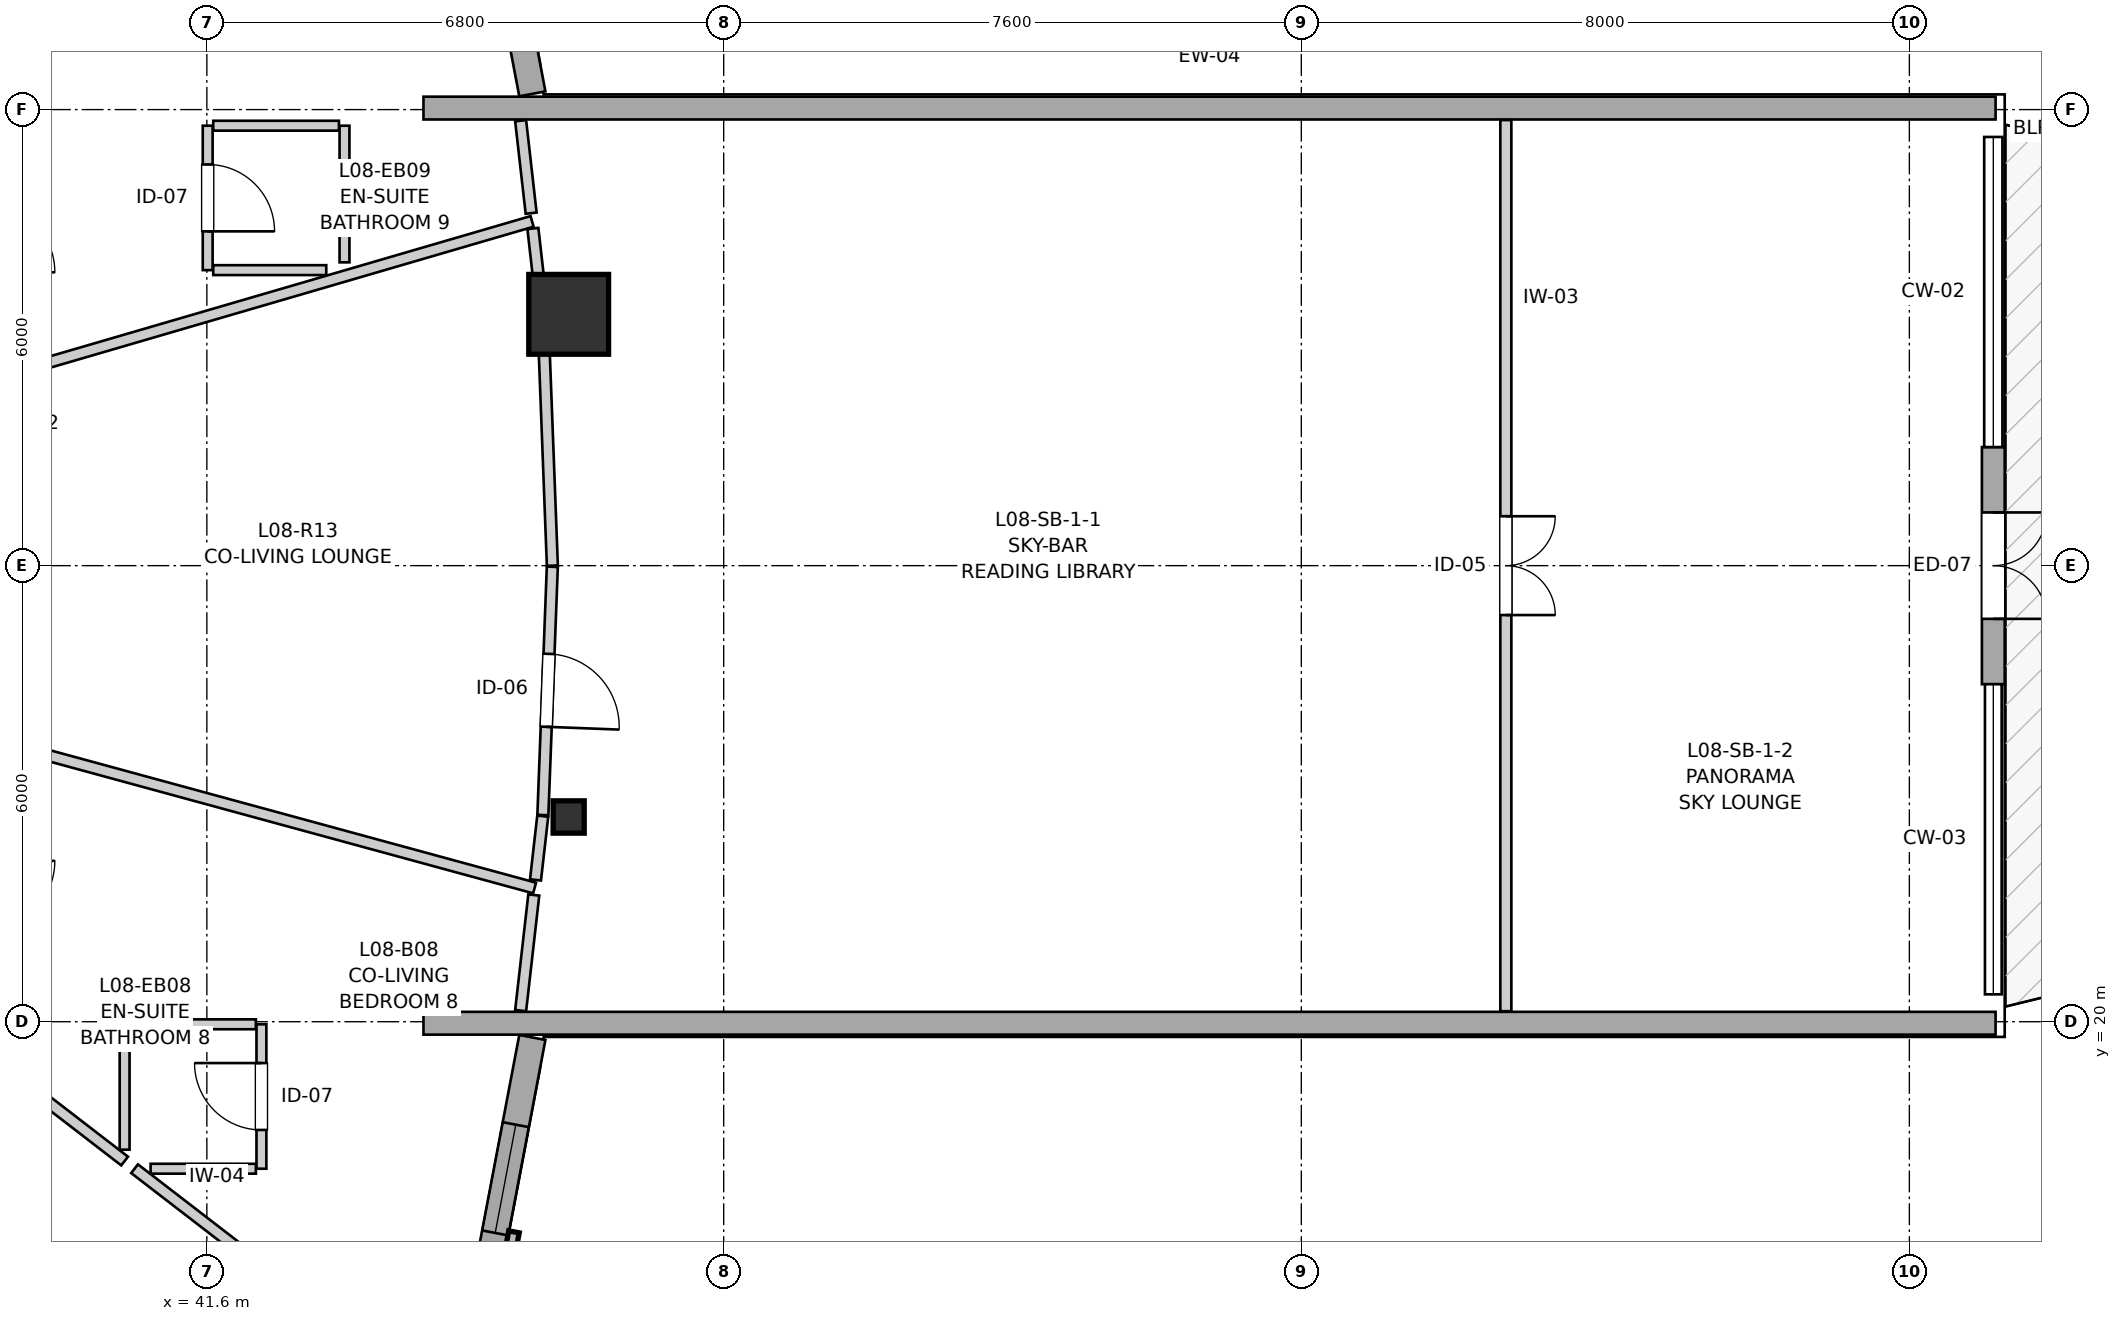
"""IFC4 building model, lengths in metres.
Left out: names, types, materials, properties, quantities, classifications, styles, units other than length and angle.
Written with IfcOpenShell. Run it as: python <this file> out.ifc"""

import sys

from ifc_helpers import new_model, si_unit, direction, frame, frame_2d, origin, origin_2d, place, context, subcontext, project, spatial, rectangle, i_section, extrude, source, transform, mapped, element, fill, save


model = new_model("IFC4")
c1 = context("Model", 3, precision=1e-05, world=origin(), true_north=direction((0.0, 1.0)))
c2 = subcontext(c1, "Body", "Model", "MODEL_VIEW")
j1 = project(units=[si_unit("LENGTHUNIT", "METRE"), si_unit("PLANEANGLEUNIT", "RADIAN")], contexts=[c1])
p1 = place(None, origin())
s1 = spatial("IfcSite", under=j1, at=p1, CompositionType="ELEMENT")
p2 = place(p1, origin())
s2 = spatial("IfcBuilding", under=s1, at=p2, CompositionType="ELEMENT")
p3 = place(p2, frame((0.0, 0.0, 30.2)))
s3 = spatial("IfcBuildingStorey", under=s2, at=p3, CompositionType="ELEMENT", Elevation=30.2)
m1 = source(origin(), c2, "Body", "SweptSolid", [
    extrude(i_section(OverallWidth=0.409, OverallDepth=0.425, WebThickness=0.03, FlangeThickness=0.048, FilletRadius=0.015, at=origin_2d()), origin(), (0.0, 0.0, 1.0), 2.935),
])
p4 = place(p3, frame((46.361, 22.694, 0.0), z_axis=(0.0, 0.0, 1.0), x_axis=(1.0, 0.0, 0.0)))
e1 = element("IfcColumn", 1, at=p4, inside=s3, PredefinedType="PILASTER", context=c2, shape_type="MappedRepresentation", body=[
    mapped(m1, transform((0.0, 0.0, 0.0), x_axis=(1.0, 0.0, 0.0), y_axis=(0.0, 1.0, 0.0), z_axis=(0.0, 0.0, 1.0), scale=1.0)),
])
m2 = source(origin(), c2, "Body", "SweptSolid", [
    extrude(rectangle(XDim=1.05, YDim=1.05, at=origin_2d()), origin(), (0.0, 0.0, 1.0), 2.935),
])
p5 = place(p3, frame((46.361, 29.306, 0.0), z_axis=(0.0, 0.0, 1.0), x_axis=(1.0, 0.0, 0.0)))
e2 = element("IfcColumn", 2, at=p5, inside=s3, PredefinedType="COLUMN", context=c2, shape_type="MappedRepresentation", body=[
    mapped(m2, transform((0.0, 0.0, 0.0), x_axis=(1.0, 0.0, 0.0), y_axis=(0.0, 1.0, 0.0), z_axis=(0.0, 0.0, 1.0), scale=1.0)),
])
p6 = place(p3, frame((45.24, 16.408, 0.0), z_axis=(0.0, 0.0, 1.0), x_axis=(0.186636709983, 0.982428999209, 0.0)))
e3 = element("IfcWall", 3, at=p6, inside=s3, PredefinedType="SOLIDWALL", context=c2, shape_type="SweptSolid", body=[
    extrude(rectangle(XDim=3.446, YDim=0.35, at=frame_2d((1.723, 0.0))), origin(), (0.0, 0.0, 1.0), 2.415),
])
p7 = place(p6, frame((0.828, 0.0, 0.82)))
e4 = element("IfcOpeningElement", 4, at=p7, cuts=e3, PredefinedType="OPENING", context=c2, shape_type="SweptSolid", body=[
    extrude(rectangle(XDim=1.45, YDim=1.25, at=frame_2d((0.725, 0.625))), frame((0.0, 0.185, 0.0), z_axis=(0.0, -1.0, 0.0), x_axis=(1.0, 0.0, 0.0)), (0.0, 0.0, 1.0), 0.37),
])
p8 = place(p3, frame((45.883, 32.207, 0.0), z_axis=(0.0, 0.0, 1.0), x_axis=(-0.186693533797, 0.982418202416, 0.0)))
e5 = element("IfcWall", 5, at=p8, inside=s3, PredefinedType="SOLIDWALL", context=c2, shape_type="SweptSolid", body=[
    extrude(rectangle(XDim=3.726, YDim=0.35, at=frame_2d((1.863, 0.0))), origin(), (0.0, 0.0, 1.0), 2.415),
])
p9 = place(p8, frame((1.313, 0.0, 0.82)))
e6 = element("IfcOpeningElement", 6, at=p9, cuts=e5, PredefinedType="OPENING", context=c2, shape_type="SweptSolid", body=[
    extrude(rectangle(XDim=1.45, YDim=1.25, at=frame_2d((0.725, 0.625))), frame((0.0, 0.185, 0.0), z_axis=(0.0, -1.0, 0.0), x_axis=(1.0, 0.0, 0.0)), (0.0, 0.0, 1.0), 0.37),
])
for number, where, z_axis, x_axis in (
    (7, (44.45, 32.02, 0.0), (0.0, 0.0, 1.0), (1.0, 0.0, 0.0)),
    (8, (44.45, 19.98, 0.0), (0.0, 0.0, 1.0), (1.0, 0.0, 0.0)),
):
    element("IfcWall", number, at=place(p3, frame(where, z_axis=z_axis, x_axis=x_axis)), inside=s3, PredefinedType="SOLIDWALL", context=c2, shape_type="SweptSolid", body=[
        extrude(rectangle(XDim=20.685, YDim=0.3, at=frame_2d((10.342, 0.0))), origin(), (0.0, 0.0, 1.0), 2.115),
    ])
p10 = place(p3, frame((65.104, 27.56, 0.0), z_axis=(0.0, 0.0, 1.0), x_axis=(0.0, -1.0, 0.0)))
e9 = element("IfcWall", 9, at=p10, inside=s3, PredefinedType="SOLIDWALL", context=c2, shape_type="SweptSolid", body=[
    extrude(rectangle(XDim=3.12, YDim=0.3, at=frame_2d((1.56, 0.0))), origin(), (0.0, 0.0, 1.0), 2.3),
])
p11 = place(p10, frame((0.86, 0.0, 0.0)))
e10 = element("IfcOpeningElement", 10, at=p11, cuts=e9, PredefinedType="OPENING", context=c2, shape_type="SweptSolid", body=[
    extrude(rectangle(XDim=1.4, YDim=2.15, at=frame_2d((0.7, 1.075))), frame((0.0, 0.16, 0.0), z_axis=(0.0, -1.0, 0.0), x_axis=(1.0, 0.0, 0.0)), (0.0, 0.0, 1.0), 0.32),
])
p12 = place(p3, frame((58.691, 31.862, 0.0), z_axis=(0.0, 0.0, 1.0), x_axis=(0.0, -1.0, 0.0)))
e11 = element("IfcWall", 11, at=p12, inside=s3, PredefinedType="PARTITIONING", context=c2, shape_type="SweptSolid", body=[
    extrude(rectangle(XDim=11.724, YDim=0.145, at=frame_2d((5.862, 0.0))), origin(), (0.0, 0.0, 1.0), 2.353),
])
p13 = place(p12, frame((5.212, 0.0, 0.0)))
e12 = element("IfcOpeningElement", 12, at=p13, cuts=e11, PredefinedType="OPENING", context=c2, shape_type="SweptSolid", body=[
    extrude(rectangle(XDim=1.3, YDim=2.1, at=frame_2d((0.65, 1.05))), frame((0.0, 0.083, 0.0), z_axis=(0.0, -1.0, 0.0), x_axis=(1.0, 0.0, 0.0)), (0.0, 0.0, 1.0), 0.165),
])
p14 = place(p3, frame((46.146, 25.985, 0.0), z_axis=(0.0, 0.0, 1.0), x_axis=(-0.038094618751, -0.999274136572, 0.0)))
e13 = element("IfcWall", 13, at=p14, inside=s3, PredefinedType="PARTITIONING", context=c2, shape_type="SweptSolid", body=[
    extrude(rectangle(XDim=3.269, YDim=0.145, at=frame_2d((1.634, 0.0))), origin(), (0.0, 0.0, 1.0), 2.403),
])
p15 = place(p14, frame((1.147, 0.0, 0.0)))
e14 = element("IfcOpeningElement", 14, at=p15, cuts=e13, PredefinedType="OPENING", context=c2, shape_type="SweptSolid", body=[
    extrude(rectangle(XDim=0.96, YDim=2.1, at=frame_2d((0.48, 1.05))), frame((0.0, 0.083, 0.0), z_axis=(0.0, -1.0, 0.0), x_axis=(1.0, 0.0, 0.0)), (0.0, 0.0, 1.0), 0.165),
])
p16 = place(p3, frame((42.318, 18.066, 0.0), z_axis=(0.0, 0.0, 1.0), x_axis=(0.0, 1.0, 0.0)))
e15 = element("IfcWall", 15, at=p16, inside=s3, PredefinedType="PARTITIONING", context=c2, shape_type="SweptSolid", body=[
    extrude(rectangle(XDim=1.9, YDim=0.13, at=frame_2d((0.95, 0.0))), origin(), (0.0, 0.0, 1.0), 2.935),
])
p17 = place(p16, frame((0.51, 0.0, 0.0)))
e16 = element("IfcOpeningElement", 16, at=p17, cuts=e15, PredefinedType="OPENING", context=c2, shape_type="SweptSolid", body=[
    extrude(rectangle(XDim=0.88, YDim=2.05, at=frame_2d((0.44, 1.025))), frame((0.0, 0.075, 0.0), z_axis=(0.0, -1.0, 0.0), x_axis=(1.0, 0.0, 0.0)), (0.0, 0.0, 1.0), 0.15),
])
p18 = place(p3, frame((41.611, 31.788, 0.0), z_axis=(0.0, 0.0, 1.0), x_axis=(0.0, -1.0, 0.0)))
e17 = element("IfcWall", 17, at=p18, inside=s3, PredefinedType="PARTITIONING", context=c2, shape_type="SweptSolid", body=[
    extrude(rectangle(XDim=1.9, YDim=0.13, at=frame_2d((0.95, 0.0))), origin(), (0.0, 0.0, 1.0), 2.935),
])
p19 = place(p18, frame((0.51, 0.0, 0.0)))
e18 = element("IfcOpeningElement", 18, at=p19, cuts=e17, PredefinedType="OPENING", context=c2, shape_type="SweptSolid", body=[
    extrude(rectangle(XDim=0.88, YDim=2.05, at=frame_2d((0.44, 1.025))), frame((0.0, 0.075, 0.0), z_axis=(0.0, -1.0, 0.0), x_axis=(1.0, 0.0, 0.0)), (0.0, 0.0, 1.0), 0.15),
])
p20 = place(p3, frame((38.81, 32.306, 0.0), z_axis=(0.0, 0.0, 1.0), x_axis=(0.801799720797, 0.597592844443, 0.0)))
e19 = element("IfcWall", 19, at=p20, inside=s3, PredefinedType="PARTITIONING", context=c2, shape_type="SweptSolid", body=[
    extrude(rectangle(XDim=7.424, YDim=0.145, at=frame_2d((3.712, 0.0))), origin(), (0.0, 0.0, 1.0), 2.935),
])
p21 = place(p3, frame((38.788, 28.46, 0.0), z_axis=(0.0, 0.0, 1.0), x_axis=(0.959983709987, 0.280055845432, 0.0)))
e20 = element("IfcWall", 20, at=p21, inside=s3, PredefinedType="PARTITIONING", context=c2, shape_type="SweptSolid", body=[
    extrude(rectangle(XDim=7.386, YDim=0.145, at=frame_2d((3.693, 0.0))), origin(), (0.0, 0.0, 1.0), 2.935),
])
p22 = place(p3, frame((38.787, 23.701, 0.0), z_axis=(0.0, 0.0, 1.0), x_axis=(0.964810342249, -0.262946769308, 0.0)))
e21 = element("IfcWall", 21, at=p22, inside=s3, PredefinedType="PARTITIONING", context=c2, shape_type="SweptSolid", body=[
    extrude(rectangle(XDim=7.385, YDim=0.145, at=frame_2d((3.692, 0.0))), origin(), (0.0, 0.0, 1.0), 2.935),
])
p23 = place(p3, frame((38.812, 17.101, 0.0), z_axis=(0.0, 0.0, 1.0), x_axis=(0.689140556814, -0.724627692649, 0.0)))
e22 = element("IfcWall", 22, at=p23, inside=s3, PredefinedType="PARTITIONING", context=c2, shape_type="SweptSolid", body=[
    extrude(rectangle(XDim=7.217, YDim=0.13, at=frame_2d((3.608, 0.0))), origin(), (0.0, 0.0, 1.0), 2.935),
])
p24 = place(p3, frame((40.649, 18.066, 0.0), z_axis=(0.0, 0.0, 1.0), x_axis=(0.792155051101, -0.610319895641, 0.0)))
e23 = element("IfcWall", 23, at=p24, inside=s3, PredefinedType="PARTITIONING", context=c2, shape_type="SweptSolid", body=[
    extrude(rectangle(XDim=5.093, YDim=0.145, at=frame_2d((2.546, 0.0))), origin(), (0.0, 0.0, 1.0), 2.935),
])
p25 = place(p3, frame((46.021, 29.281, 0.0), z_axis=(0.0, 0.0, 1.0), x_axis=(0.038070453861, -0.999275057501, 0.0)))
e24 = element("IfcWall", 24, at=p25, inside=s3, PredefinedType="PARTITIONING", context=c2, shape_type="SweptSolid", body=[
    extrude(rectangle(XDim=3.283, YDim=0.145, at=frame_2d((1.642, 0.0))), origin(), (0.0, 0.0, 1.0), 2.403),
])
p26 = place(p3, frame((38.811, 19.482, 0.0), z_axis=(0.0, 0.0, 1.0), x_axis=(0.792185877025, -0.61027988353, 0.0)))
e25 = element("IfcWall", 25, at=p26, inside=s3, PredefinedType="PARTITIONING", context=c2, shape_type="SweptSolid", body=[
    extrude(rectangle(XDim=2.156, YDim=0.145, at=frame_2d((1.078, 0.0))), origin(), (0.0, 0.0, 1.0), 2.935),
])
p27 = place(p3, frame((43.411, 29.99, 0.0), z_axis=(0.0, 0.0, 1.0), x_axis=(0.0, 1.0, 0.0)))
e26 = element("IfcWall", 26, at=p27, inside=s3, PredefinedType="PARTITIONING", context=c2, shape_type="SweptSolid", body=[
    extrude(rectangle(XDim=1.798, YDim=0.13, at=frame_2d((0.899, 0.0))), origin(), (0.0, 0.0, 1.0), 2.935),
])
p28 = place(p3, frame((41.684, 31.788, 0.0), z_axis=(0.0, 0.0, 1.0), x_axis=(1.0, 0.0, 0.0)))
e27 = element("IfcWall", 27, at=p28, inside=s3, PredefinedType="PARTITIONING", context=c2, shape_type="SweptSolid", body=[
    extrude(rectangle(XDim=1.654, YDim=0.13, at=frame_2d((0.827, 0.0))), origin(), (0.0, 0.0, 1.0), 2.103),
])
p29 = place(p3, frame((41.684, 29.888, 0.0), z_axis=(0.0, 0.0, 1.0), x_axis=(1.0, 0.0, 0.0)))
e28 = element("IfcWall", 28, at=p29, inside=s3, PredefinedType="PARTITIONING", context=c2, shape_type="SweptSolid", body=[
    extrude(rectangle(XDim=1.487, YDim=0.13, at=frame_2d((0.743, 0.0))), origin(), (0.0, 0.0, 1.0), 2.935),
])
p30 = place(p3, frame((40.518, 19.966, 0.0), z_axis=(0.0, 0.0, 1.0), x_axis=(1.0, 0.0, 0.0)))
e29 = element("IfcWall", 29, at=p30, inside=s3, PredefinedType="PARTITIONING", context=c2, shape_type="SweptSolid", body=[
    extrude(rectangle(XDim=1.727, YDim=0.13, at=frame_2d((0.864, 0.0))), origin(), (0.0, 0.0, 1.0), 2.103),
])
p31 = place(p3, frame((40.518, 18.317, 0.0), z_axis=(0.0, 0.0, 1.0), x_axis=(0.0, 1.0, 0.0)))
e30 = element("IfcWall", 30, at=p31, inside=s3, PredefinedType="PARTITIONING", context=c2, shape_type="SweptSolid", body=[
    extrude(rectangle(XDim=1.576, YDim=0.13, at=frame_2d((0.788, 0.0))), origin(), (0.0, 0.0, 1.0), 2.935),
])
p32 = place(p3, frame((40.86, 18.066, 0.0), z_axis=(0.0, 0.0, 1.0), x_axis=(1.0, 0.0, 0.0)))
e31 = element("IfcWall", 31, at=p32, inside=s3, PredefinedType="PARTITIONING", context=c2, shape_type="SweptSolid", body=[
    extrude(rectangle(XDim=1.385, YDim=0.13, at=frame_2d((0.692, 0.0))), origin(), (0.0, 0.0, 1.0), 2.935),
])
p33 = place(p3, frame((45.729, 20.146, 0.0), z_axis=(0.0, 0.0, 1.0), x_axis=(0.113074294354, 0.993586535716, 0.0)))
e32 = element("IfcWall", 32, at=p33, inside=s3, PredefinedType="PARTITIONING", context=c2, shape_type="SweptSolid", body=[
    extrude(rectangle(XDim=1.531, YDim=0.145, at=frame_2d((0.765, 0.0))), origin(), (0.0, 0.0, 1.0), 2.403),
])
p34 = place(p3, frame((45.89, 30.436, 0.0), z_axis=(0.0, 0.0, 1.0), x_axis=(0.113024308153, -0.993592223081, 0.0)))
e33 = element("IfcWall", 33, at=p34, inside=s3, PredefinedType="PARTITIONING", context=c2, shape_type="SweptSolid", body=[
    extrude(rectangle(XDim=1.147, YDim=0.145, at=frame_2d((0.573, 0.0))), origin(), (0.0, 0.0, 1.0), 2.403),
])
p35 = place(p3, frame((45.729, 31.854, 0.0), z_axis=(0.0, 0.0, 1.0), x_axis=(0.112860473391, -0.993610846129, 0.0)))
e34 = element("IfcWall", 34, at=p35, inside=s3, PredefinedType="PARTITIONING", context=c2, shape_type="SweptSolid", body=[
    extrude(rectangle(XDim=1.224, YDim=0.145, at=frame_2d((0.612, 0.0))), origin(), (0.0, 0.0, 1.0), 2.403),
])
p36 = place(p3, frame((45.924, 21.866, 0.0), z_axis=(0.0, 0.0, 1.0), x_axis=(0.112844765803, 0.993612630169, 0.0)))
e35 = element("IfcWall", 35, at=p36, inside=s3, PredefinedType="PARTITIONING", context=c2, shape_type="SweptSolid", body=[
    extrude(rectangle(XDim=0.844, YDim=0.145, at=frame_2d((0.422, 0.0))), origin(), (0.0, 0.0, 1.0), 2.403),
])
m3 = source(origin(), c2, "Body", "SweptSolid", [
    extrude(rectangle(XDim=1.45, YDim=1.25, at=frame_2d((0.725, 0.625))), frame((0.0, 0.03, 0.0), z_axis=(0.0, -1.0, 0.0), x_axis=(1.0, 0.0, 0.0)), (0.0, 0.0, 1.0), 0.06),
])
p37 = place(p7, origin())
e36 = element("IfcWindow", 36, at=p37, inside=s3, PartitioningType="SINGLE_PANEL", PredefinedType="WINDOW", context=c2, shape_type="MappedRepresentation", body=[
    mapped(m3, transform((0.0, 0.0, 0.0), x_axis=(1.0, 0.0, 0.0), y_axis=(0.0, 1.0, 0.0), z_axis=(0.0, 0.0, 1.0), scale=1.0)),
])
fill(e4, e36)
m4 = source(origin(), c2, "Body", "SweptSolid", [
    extrude(rectangle(XDim=1.4, YDim=2.15, at=frame_2d((0.7, 1.075))), frame((0.0, 0.025, 0.0), z_axis=(0.0, -1.0, 0.0), x_axis=(1.0, 0.0, 0.0)), (0.0, 0.0, 1.0), 0.05),
])
p38 = place(p11, origin())
e37 = element("IfcDoor", 37, at=p38, inside=s3, OperationType="DOUBLE_DOOR_SINGLE_SWING", PredefinedType="DOOR", context=c2, shape_type="MappedRepresentation", body=[
    mapped(m4, transform((0.0, 0.0, 0.0), x_axis=(1.0, 0.0, 0.0), y_axis=(0.0, 1.0, 0.0), z_axis=(0.0, 0.0, 1.0), scale=1.0)),
])
fill(e10, e37)
m5 = source(origin(), c2, "Body", "SweptSolid", [
    extrude(rectangle(XDim=1.3, YDim=2.1, at=frame_2d((0.65, 1.05))), frame((0.0, 0.025, 0.0), z_axis=(0.0, -1.0, 0.0), x_axis=(1.0, 0.0, 0.0)), (0.0, 0.0, 1.0), 0.05),
])
p39 = place(p13, origin())
e38 = element("IfcDoor", 38, at=p39, inside=s3, OperationType="DOUBLE_DOOR_SINGLE_SWING", PredefinedType="DOOR", context=c2, shape_type="MappedRepresentation", body=[
    mapped(m5, transform((0.0, 0.0, 0.0), x_axis=(1.0, 0.0, 0.0), y_axis=(0.0, 1.0, 0.0), z_axis=(0.0, 0.0, 1.0), scale=1.0)),
])
fill(e12, e38)
m6 = source(origin(), c2, "Body", "SweptSolid", [
    extrude(rectangle(XDim=0.96, YDim=2.1, at=frame_2d((0.48, 1.05))), frame((0.0, 0.025, 0.0), z_axis=(0.0, -1.0, 0.0), x_axis=(1.0, 0.0, 0.0)), (0.0, 0.0, 1.0), 0.05),
])
p40 = place(p15, origin())
e39 = element("IfcDoor", 39, at=p40, inside=s3, OperationType="SINGLE_SWING_RIGHT", PredefinedType="DOOR", context=c2, shape_type="MappedRepresentation", body=[
    mapped(m6, transform((0.0, 0.0, 0.0), x_axis=(1.0, 0.0, 0.0), y_axis=(0.0, 1.0, 0.0), z_axis=(0.0, 0.0, 1.0), scale=1.0)),
])
fill(e14, e39)
m7 = source(origin(), c2, "Body", "SweptSolid", [
    extrude(rectangle(XDim=0.88, YDim=2.05, at=frame_2d((0.44, 1.025))), frame((0.0, 0.025, 0.0), z_axis=(0.0, -1.0, 0.0), x_axis=(1.0, 0.0, 0.0)), (0.0, 0.0, 1.0), 0.05),
])
p41 = place(p17, origin())
e40 = element("IfcDoor", 40, at=p41, inside=s3, OperationType="SINGLE_SWING_RIGHT", PredefinedType="DOOR", context=c2, shape_type="MappedRepresentation", body=[
    mapped(m7, transform((0.0, 0.0, 0.0), x_axis=(1.0, 0.0, 0.0), y_axis=(0.0, 1.0, 0.0), z_axis=(0.0, 0.0, 1.0), scale=1.0)),
])
fill(e16, e40)
p42 = place(p19, origin())
e41 = element("IfcDoor", 41, at=p42, inside=s3, OperationType="SINGLE_SWING_RIGHT", PredefinedType="DOOR", context=c2, shape_type="MappedRepresentation", body=[
    mapped(m7, transform((0.0, 0.0, 0.0), x_axis=(1.0, 0.0, 0.0), y_axis=(0.0, 1.0, 0.0), z_axis=(0.0, 0.0, 1.0), scale=1.0)),
])
fill(e18, e41)
save(model, sys.argv[1])
